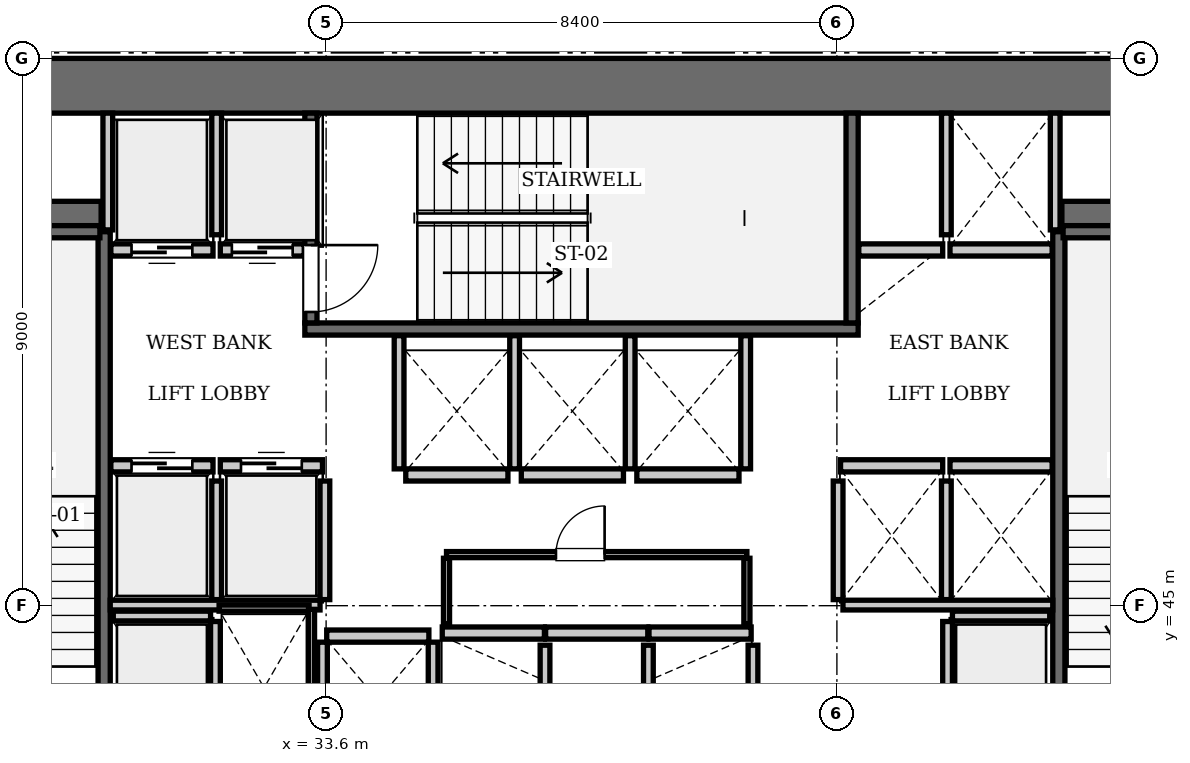
"""IFC4 building model, lengths in metres.
Left out: names, types, materials, properties, quantities, classifications, styles, units other than length and angle.
Written with IfcOpenShell. Run it as: python <this file> out.ifc"""

import sys

from ifc_helpers import new_model, si_unit, direction, frame, frame_2d, origin, place, context, subcontext, project, spatial, rectangle, extrude, element, fill, save


model = new_model("IFC4")
c1 = context("Model", 3, precision=1e-05, world=origin(), true_north=direction((0.0, 1.0)))
c2 = subcontext(c1, "Body", "Model", "MODEL_VIEW")
j1 = project(units=[si_unit("LENGTHUNIT", "METRE"), si_unit("PLANEANGLEUNIT", "RADIAN")], contexts=[c1])
p1 = place(None, origin())
s1 = spatial("IfcSite", under=j1, at=p1, CompositionType="ELEMENT")
p2 = place(p1, origin())
s2 = spatial("IfcBuilding", under=s1, at=p2, CompositionType="ELEMENT")
p3 = place(p2, frame((0.0, 0.0, 65.45)))
s3 = spatial("IfcBuildingStorey", under=s2, at=p3, CompositionType="ELEMENT", Elevation=65.45)
p4 = place(p3, frame((25.2, 53.55, 0.0), z_axis=(0.0, 0.0, 1.0), x_axis=(1.0, 0.0, 0.0)))
e1 = element("IfcWall", 1, at=p4, inside=s3, PredefinedType="SHEAR", context=c2, shape_type="SweptSolid", body=[
    extrude(rectangle(XDim=25.2, YDim=0.9, at=frame_2d((12.6, 0.0))), origin(), (0.0, 0.0, 1.0), 3.85),
])
p5 = place(p3, frame((26.1, 51.4, 0.0), z_axis=(0.0, 0.0, 1.0), x_axis=(1.0, 0.0, 0.0)))
e2 = element("IfcWall", 2, at=p5, inside=s3, PredefinedType="SHEAR", context=c2, shape_type="SweptSolid", body=[
    extrude(rectangle(XDim=3.8, YDim=0.5, at=frame_2d((1.9, 0.0))), origin(), (0.0, 0.0, 1.0), 3.85),
])
p6 = place(p3, frame((45.7, 51.4, 0.0), z_axis=(0.0, 0.0, 1.0), x_axis=(1.0, 0.0, 0.0)))
e3 = element("IfcWall", 3, at=p6, inside=s3, PredefinedType="SHEAR", context=c2, shape_type="SweptSolid", body=[
    extrude(rectangle(XDim=3.8, YDim=0.5, at=frame_2d((1.9, 0.0))), origin(), (0.0, 0.0, 1.0), 3.85),
])
p7 = place(p3, frame((29.95, 42.3, 0.0), z_axis=(0.0, 0.0, 1.0), x_axis=(0.0, 1.0, 0.0)))
e4 = element("IfcWall", 4, at=p7, inside=s3, PredefinedType="SOLIDWALL", context=c2, shape_type="SweptSolid", body=[
    extrude(rectangle(XDim=8.85, YDim=0.2, at=frame_2d((4.425, 0.0))), origin(), (0.0, 0.0, 1.0), 3.61),
])
p8 = place(p3, frame((26.38, 51.15, 0.0), z_axis=(0.0, 0.0, 1.0), x_axis=(1.0, 0.0, 0.0)))
e5 = element("IfcWall", 5, at=p8, inside=s3, PredefinedType="SOLIDWALL", context=c2, shape_type="SweptSolid", body=[
    extrude(rectangle(XDim=3.5, YDim=0.2, at=frame_2d((1.75, 0.0))), origin(), (0.0, 0.0, 1.0), 3.61),
])
p9 = place(p3, frame((33.25, 49.55, 0.0), z_axis=(0.0, 0.0, 1.0), x_axis=(1.0, 0.0, 0.0)))
e6 = element("IfcWall", 6, at=p9, inside=s3, PredefinedType="SOLIDWALL", context=c2, shape_type="SweptSolid", body=[
    extrude(rectangle(XDim=9.1, YDim=0.2, at=frame_2d((4.55, 0.0))), origin(), (0.0, 0.0, 1.0), 3.61),
])
p10 = place(p3, frame((42.25, 49.65, 0.0), z_axis=(0.0, 0.0, 1.0), x_axis=(0.0, 1.0, 0.0)))
e7 = element("IfcWall", 7, at=p10, inside=s3, PredefinedType="SOLIDWALL", context=c2, shape_type="SweptSolid", body=[
    extrude(rectangle(XDim=3.45, YDim=0.2, at=frame_2d((1.725, 0.0))), origin(), (0.0, 0.0, 1.0), 3.61),
])
p11 = place(p3, frame((33.35, 49.65, 0.0), z_axis=(0.0, 0.0, 1.0), x_axis=(0.0, 1.0, 0.0)))
e8 = element("IfcWall", 8, at=p11, inside=s3, PredefinedType="SOLIDWALL", context=c2, shape_type="SweptSolid", body=[
    extrude(rectangle(XDim=3.45, YDim=0.2, at=frame_2d((1.725, 0.0))), origin(), (0.0, 0.0, 1.0), 3.61),
])
p12 = place(p11, frame((0.18, 0.0, 0.0)))
e9 = element("IfcOpeningElement", 9, at=p12, cuts=e8, PredefinedType="OPENING", context=c2, shape_type="SweptSolid", body=[
    extrude(rectangle(XDim=1.1, YDim=2.15, at=frame_2d((0.55, 1.075))), frame((0.0, 0.11, 0.0), z_axis=(0.0, -1.0, 0.0), x_axis=(1.0, 0.0, 0.0)), (0.0, 0.0, 1.0), 0.22),
])
p13 = place(p3, frame((45.65, 42.3, 0.0), z_axis=(0.0, 0.0, 1.0), x_axis=(0.0, 1.0, 0.0)))
e10 = element("IfcWall", 10, at=p13, inside=s3, PredefinedType="SOLIDWALL", context=c2, shape_type="SweptSolid", body=[
    extrude(rectangle(XDim=8.85, YDim=0.2, at=frame_2d((4.425, 0.0))), origin(), (0.0, 0.0, 1.0), 3.61),
])
p14 = place(p3, frame((45.72, 51.15, 0.0), z_axis=(0.0, 0.0, 1.0), x_axis=(1.0, 0.0, 0.0)))
e11 = element("IfcWall", 11, at=p14, inside=s3, PredefinedType="SOLIDWALL", context=c2, shape_type="SweptSolid", body=[
    extrude(rectangle(XDim=3.5, YDim=0.2, at=frame_2d((1.75, 0.0))), origin(), (0.0, 0.0, 1.0), 3.61),
])
p15 = place(p3, frame((30.06, 47.3, 0.0), z_axis=(0.0, 0.0, 1.0), x_axis=(1.0, 0.0, 0.0)))
e12 = element("IfcWall", 12, at=p15, inside=s3, PredefinedType="SOLIDWALL", context=c2, shape_type="SweptSolid", body=[
    extrude(rectangle(XDim=1.68, YDim=0.2, at=frame_2d((0.84, 0.0))), origin(), (0.0, 0.0, 1.0), 3.61),
])
p16 = place(p15, frame((0.34, 0.0, 0.0)))
e13 = element("IfcOpeningElement", 13, at=p16, cuts=e12, PredefinedType="OPENING", context=c2, shape_type="SweptSolid", body=[
    extrude(rectangle(XDim=1.0, YDim=2.15, at=frame_2d((0.5, 1.075))), frame((0.0, 0.11, 0.0), z_axis=(0.0, -1.0, 0.0), x_axis=(1.0, 0.0, 0.0)), (0.0, 0.0, 1.0), 0.22),
])
p17 = place(p3, frame((31.86, 47.3, 0.0), z_axis=(0.0, 0.0, 1.0), x_axis=(1.0, 0.0, 0.0)))
e14 = element("IfcWall", 14, at=p17, inside=s3, PredefinedType="SOLIDWALL", context=c2, shape_type="SweptSolid", body=[
    extrude(rectangle(XDim=1.68, YDim=0.2, at=frame_2d((0.84, 0.0))), origin(), (0.0, 0.0, 1.0), 3.61),
])
p18 = place(p17, frame((0.34, 0.0, 0.0)))
e15 = element("IfcOpeningElement", 15, at=p18, cuts=e14, PredefinedType="OPENING", context=c2, shape_type="SweptSolid", body=[
    extrude(rectangle(XDim=1.0, YDim=2.15, at=frame_2d((0.5, 1.075))), frame((0.0, 0.11, 0.0), z_axis=(0.0, -1.0, 0.0), x_axis=(1.0, 0.0, 0.0)), (0.0, 0.0, 1.0), 0.22),
])
p19 = place(p3, frame((30.06, 50.85, 0.0), z_axis=(0.0, 0.0, 1.0), x_axis=(1.0, 0.0, 0.0)))
e16 = element("IfcWall", 16, at=p19, inside=s3, PredefinedType="SOLIDWALL", context=c2, shape_type="SweptSolid", body=[
    extrude(rectangle(XDim=1.68, YDim=0.2, at=frame_2d((0.84, 0.0))), origin(), (0.0, 0.0, 1.0), 3.61),
])
p20 = place(p19, frame((0.34, 0.0, 0.0)))
e17 = element("IfcOpeningElement", 17, at=p20, cuts=e16, PredefinedType="OPENING", context=c2, shape_type="SweptSolid", body=[
    extrude(rectangle(XDim=1.0, YDim=2.15, at=frame_2d((0.5, 1.075))), frame((0.0, 0.11, 0.0), z_axis=(0.0, -1.0, 0.0), x_axis=(1.0, 0.0, 0.0)), (0.0, 0.0, 1.0), 0.22),
])
p21 = place(p3, frame((31.86, 50.85, 0.0), z_axis=(0.0, 0.0, 1.0), x_axis=(1.0, 0.0, 0.0)))
e18 = element("IfcWall", 18, at=p21, inside=s3, PredefinedType="SOLIDWALL", context=c2, shape_type="SweptSolid", body=[
    extrude(rectangle(XDim=1.38, YDim=0.2, at=frame_2d((0.69, 0.0))), origin(), (0.0, 0.0, 1.0), 3.61),
])
p22 = place(p21, frame((0.19, 0.0, 0.0)))
e19 = element("IfcOpeningElement", 19, at=p22, cuts=e18, PredefinedType="OPENING", context=c2, shape_type="SweptSolid", body=[
    extrude(rectangle(XDim=1.0, YDim=2.15, at=frame_2d((0.5, 1.075))), frame((0.0, 0.11, 0.0), z_axis=(0.0, -1.0, 0.0), x_axis=(1.0, 0.0, 0.0)), (0.0, 0.0, 1.0), 0.22),
])
for number, where, z_axis, x_axis in (
    (20, (42.06, 47.3, 0.0), (0.0, 0.0, 1.0), (1.0, 0.0, 0.0)),
    (21, (43.86, 47.3, 0.0), (0.0, 0.0, 1.0), (1.0, 0.0, 0.0)),
):
    element("IfcWall", number, at=place(p3, frame(where, z_axis=z_axis, x_axis=x_axis)), inside=s3, PredefinedType="SOLIDWALL", context=c2, shape_type="SweptSolid", body=[
        extrude(rectangle(XDim=1.68, YDim=0.2, at=frame_2d((0.84, 0.0))), origin(), (0.0, 0.0, 1.0), 3.61),
    ])
p23 = place(p3, frame((42.36, 50.85, 0.0), z_axis=(0.0, 0.0, 1.0), x_axis=(1.0, 0.0, 0.0)))
e22 = element("IfcWall", 22, at=p23, inside=s3, PredefinedType="SOLIDWALL", context=c2, shape_type="SweptSolid", body=[
    extrude(rectangle(XDim=1.38, YDim=0.2, at=frame_2d((0.69, 0.0))), origin(), (0.0, 0.0, 1.0), 3.61),
])
for number, where, z_axis, x_axis in (
    (23, (43.86, 50.85, 0.0), (0.0, 0.0, 1.0), (1.0, 0.0, 0.0)),
    (24, (35.51, 44.55, 0.0), (0.0, 0.0, 1.0), (1.0, 0.0, 0.0)),
    (25, (37.21, 44.55, 0.0), (0.0, 0.0, 1.0), (1.0, 0.0, 0.0)),
):
    element("IfcWall", number, at=place(p3, frame(where, z_axis=z_axis, x_axis=x_axis)), inside=s3, PredefinedType="SOLIDWALL", context=c2, shape_type="SweptSolid", body=[
        extrude(rectangle(XDim=1.68, YDim=0.2, at=frame_2d((0.84, 0.0))), origin(), (0.0, 0.0, 1.0), 3.61),
    ])
for number, where, z_axis, x_axis in (
    (26, (38.91, 44.55, 0.0), (0.0, 0.0, 1.0), (1.0, 0.0, 0.0)),
    (27, (34.91, 47.15, 0.0), (0.0, 0.0, 1.0), (1.0, 0.0, 0.0)),
):
    element("IfcWall", number, at=place(p3, frame(where, z_axis=z_axis, x_axis=x_axis)), inside=s3, PredefinedType="SOLIDWALL", context=c2, shape_type="SweptSolid", body=[
        extrude(rectangle(XDim=1.68, YDim=0.2, at=frame_2d((0.84, 0.0))), origin(), (0.0, 0.0, 1.0), 3.61),
    ])
for number, where, z_axis, x_axis in (
    (28, (36.81, 47.15, 0.0), (0.0, 0.0, 1.0), (1.0, 0.0, 0.0)),
    (29, (38.71, 47.15, 0.0), (0.0, 0.0, 1.0), (1.0, 0.0, 0.0)),
    (30, (33.61, 44.5, 0.0), (0.0, 0.0, 1.0), (1.0, 0.0, 0.0)),
):
    element("IfcWall", number, at=place(p3, frame(where, z_axis=z_axis, x_axis=x_axis)), inside=s3, PredefinedType="SOLIDWALL", context=c2, shape_type="SweptSolid", body=[
        extrude(rectangle(XDim=1.68, YDim=0.2, at=frame_2d((0.84, 0.0))), origin(), (0.0, 0.0, 1.0), 3.61),
    ])
p24 = place(p3, frame((30.1, 44.83, 0.0), z_axis=(0.0, 0.0, 1.0), x_axis=(1.0, 0.0, 0.0)))
e31 = element("IfcWall", 31, at=p24, inside=s3, PredefinedType="SOLIDWALL", context=c2, shape_type="SweptSolid", body=[
    extrude(rectangle(XDim=1.6, YDim=0.16, at=frame_2d((0.8, 0.0))), origin(), (0.0, 0.0, 1.0), 3.61),
])
p25 = place(p3, frame((31.78, 42.3, 0.0), z_axis=(0.0, 0.0, 1.0), x_axis=(0.0, 1.0, 0.0)))
e32 = element("IfcWall", 32, at=p25, inside=s3, PredefinedType="SOLIDWALL", context=c2, shape_type="SweptSolid", body=[
    extrude(rectangle(XDim=2.44, YDim=0.16, at=frame_2d((1.22, 0.0))), origin(), (0.0, 0.0, 1.0), 3.61),
])
p26 = place(p3, frame((43.9, 44.83, 0.0), z_axis=(0.0, 0.0, 1.0), x_axis=(1.0, 0.0, 0.0)))
e33 = element("IfcWall", 33, at=p26, inside=s3, PredefinedType="SOLIDWALL", context=c2, shape_type="SweptSolid", body=[
    extrude(rectangle(XDim=1.6, YDim=0.16, at=frame_2d((0.8, 0.0))), origin(), (0.0, 0.0, 1.0), 3.61),
])
p27 = place(p3, frame((43.82, 42.3, 0.0), z_axis=(0.0, 0.0, 1.0), x_axis=(0.0, 1.0, 0.0)))
e34 = element("IfcWall", 34, at=p27, inside=s3, PredefinedType="SOLIDWALL", context=c2, shape_type="SweptSolid", body=[
    extrude(rectangle(XDim=2.44, YDim=0.16, at=frame_2d((1.22, 0.0))), origin(), (0.0, 0.0, 1.0), 3.61),
])
for number, where, z_axis, x_axis in (
    (35, (31.8, 45.1, 0.0), (0.0, 0.0, 1.0), (0.0, 1.0, 0.0)),
    (36, (33.58, 45.1, 0.0), (0.0, 0.0, 1.0), (0.0, 1.0, 0.0)),
):
    element("IfcWall", number, at=place(p3, frame(where, z_axis=z_axis, x_axis=x_axis)), inside=s3, PredefinedType="SOLIDWALL", context=c2, shape_type="SweptSolid", body=[
        extrude(rectangle(XDim=1.95, YDim=0.16, at=frame_2d((0.975, 0.0))), origin(), (0.0, 0.0, 1.0), 3.61),
    ])
p28 = place(p3, frame((30.05, 45.01, 0.0), z_axis=(0.0, 0.0, 1.0), x_axis=(1.0, 0.0, 0.0)))
e37 = element("IfcWall", 37, at=p28, inside=s3, PredefinedType="SOLIDWALL", context=c2, shape_type="SweptSolid", body=[
    extrude(rectangle(XDim=3.45, YDim=0.16, at=frame_2d((1.725, 0.0))), origin(), (0.0, 0.0, 1.0), 3.61),
])
p29 = place(p3, frame((30.01, 51.18, 0.0), z_axis=(0.0, 0.0, 1.0), x_axis=(0.0, 1.0, 0.0)))
e38 = element("IfcWall", 38, at=p29, inside=s3, PredefinedType="SOLIDWALL", context=c2, shape_type="SweptSolid", body=[
    extrude(rectangle(XDim=1.92, YDim=0.16, at=frame_2d((0.96, 0.0))), origin(), (0.0, 0.0, 1.0), 3.61),
])
p30 = place(p3, frame((31.8, 51.1, 0.0), z_axis=(0.0, 0.0, 1.0), x_axis=(0.0, 1.0, 0.0)))
e39 = element("IfcWall", 39, at=p30, inside=s3, PredefinedType="SOLIDWALL", context=c2, shape_type="SweptSolid", body=[
    extrude(rectangle(XDim=2.0, YDim=0.16, at=frame_2d((1.0, 0.0))), origin(), (0.0, 0.0, 1.0), 3.61),
])
for number, where, z_axis, x_axis in (
    (40, (42.02, 45.1, 0.0), (0.0, 0.0, 1.0), (0.0, 1.0, 0.0)),
    (41, (43.8, 45.1, 0.0), (0.0, 0.0, 1.0), (0.0, 1.0, 0.0)),
):
    element("IfcWall", number, at=place(p3, frame(where, z_axis=z_axis, x_axis=x_axis)), inside=s3, PredefinedType="SOLIDWALL", context=c2, shape_type="SweptSolid", body=[
        extrude(rectangle(XDim=1.95, YDim=0.16, at=frame_2d((0.975, 0.0))), origin(), (0.0, 0.0, 1.0), 3.61),
    ])
p31 = place(p3, frame((42.1, 45.01, 0.0), z_axis=(0.0, 0.0, 1.0), x_axis=(1.0, 0.0, 0.0)))
e42 = element("IfcWall", 42, at=p31, inside=s3, PredefinedType="SOLIDWALL", context=c2, shape_type="SweptSolid", body=[
    extrude(rectangle(XDim=3.45, YDim=0.16, at=frame_2d((1.725, 0.0))), origin(), (0.0, 0.0, 1.0), 3.61),
])
p32 = place(p3, frame((45.59, 51.18, 0.0), z_axis=(0.0, 0.0, 1.0), x_axis=(0.0, 1.0, 0.0)))
e43 = element("IfcWall", 43, at=p32, inside=s3, PredefinedType="SOLIDWALL", context=c2, shape_type="SweptSolid", body=[
    extrude(rectangle(XDim=1.92, YDim=0.16, at=frame_2d((0.96, 0.0))), origin(), (0.0, 0.0, 1.0), 3.61),
])
p33 = place(p3, frame((43.8, 51.1, 0.0), z_axis=(0.0, 0.0, 1.0), x_axis=(0.0, 1.0, 0.0)))
e44 = element("IfcWall", 44, at=p33, inside=s3, PredefinedType="SOLIDWALL", context=c2, shape_type="SweptSolid", body=[
    extrude(rectangle(XDim=2.0, YDim=0.16, at=frame_2d((1.0, 0.0))), origin(), (0.0, 0.0, 1.0), 3.61),
])
for number, where, z_axis, x_axis in (
    (45, (37.2, 42.3, 0.0), (0.0, 0.0, 1.0), (0.0, 1.0, 0.0)),
    (46, (38.9, 42.3, 0.0), (0.0, 0.0, 1.0), (0.0, 1.0, 0.0)),
    (47, (40.62, 42.3, 0.0), (0.0, 0.0, 1.0), (0.0, 1.0, 0.0)),
):
    element("IfcWall", number, at=place(p3, frame(where, z_axis=z_axis, x_axis=x_axis)), inside=s3, PredefinedType="SOLIDWALL", context=c2, shape_type="SweptSolid", body=[
        extrude(rectangle(XDim=2.05, YDim=0.16, at=frame_2d((1.025, 0.0))), origin(), (0.0, 0.0, 1.0), 3.61),
    ])
for number, where, z_axis, x_axis in (
    (48, (34.8, 47.25, 0.0), (0.0, 0.0, 1.0), (0.0, 1.0, 0.0)),
    (49, (36.7, 47.25, 0.0), (0.0, 0.0, 1.0), (0.0, 1.0, 0.0)),
    (50, (38.6, 47.25, 0.0), (0.0, 0.0, 1.0), (0.0, 1.0, 0.0)),
    (51, (40.5, 47.25, 0.0), (0.0, 0.0, 1.0), (0.0, 1.0, 0.0)),
):
    element("IfcWall", number, at=place(p3, frame(where, z_axis=z_axis, x_axis=x_axis)), inside=s3, PredefinedType="SOLIDWALL", context=c2, shape_type="SweptSolid", body=[
        extrude(rectangle(XDim=2.19, YDim=0.16, at=frame_2d((1.095, 0.0))), origin(), (0.0, 0.0, 1.0), 3.61),
    ])
for number, where, z_axis, x_axis in (
    (52, (33.54, 42.3, 0.0), (0.0, 0.0, 1.0), (0.0, 1.0, 0.0)),
    (53, (35.36, 42.3, 0.0), (0.0, 0.0, 1.0), (0.0, 1.0, 0.0)),
):
    element("IfcWall", number, at=place(p3, frame(where, z_axis=z_axis, x_axis=x_axis)), inside=s3, PredefinedType="SOLIDWALL", context=c2, shape_type="SweptSolid", body=[
        extrude(rectangle(XDim=2.1, YDim=0.16, at=frame_2d((1.05, 0.0))), origin(), (0.0, 0.0, 1.0), 3.61),
    ])
p34 = place(p3, frame((31.84, 44.96, 0.0), z_axis=(0.0, 0.0, 1.0), x_axis=(1.0, 0.0, 0.0)))
e54 = element("IfcWall", 54, at=p34, inside=s3, PredefinedType="PARTITIONING", context=c2, shape_type="SweptSolid", body=[
    extrude(rectangle(XDim=1.48, YDim=0.1, at=frame_2d((0.74, 0.0))), origin(), (0.0, 0.0, 1.0), 3.61),
])
p35 = place(p3, frame((33.36, 42.36, 0.0), z_axis=(0.0, 0.0, 1.0), x_axis=(0.0, 1.0, 0.0)))
e55 = element("IfcWall", 55, at=p35, inside=s3, PredefinedType="PARTITIONING", context=c2, shape_type="SweptSolid", body=[
    extrude(rectangle(XDim=2.58, YDim=0.1, at=frame_2d((1.29, 0.0))), origin(), (0.0, 0.0, 1.0), 3.61),
])
p36 = place(p3, frame((35.58, 45.84, 0.0), z_axis=(0.0, 0.0, 1.0), x_axis=(1.0, 0.0, 0.0)))
e56 = element("IfcWall", 56, at=p36, inside=s3, PredefinedType="PARTITIONING", context=c2, shape_type="SweptSolid", body=[
    extrude(rectangle(XDim=4.94, YDim=0.1, at=frame_2d((2.47, 0.0))), origin(), (0.0, 0.0, 1.0), 3.61),
])
p37 = place(p36, frame((1.8, 0.0, 0.0)))
e57 = element("IfcOpeningElement", 57, at=p37, cuts=e56, PredefinedType="OPENING", context=c2, shape_type="SweptSolid", body=[
    extrude(rectangle(XDim=0.8, YDim=2.05, at=frame_2d((0.4, 1.025))), frame((0.0, 0.06, 0.0), z_axis=(0.0, -1.0, 0.0), x_axis=(1.0, 0.0, 0.0)), (0.0, 0.0, 1.0), 0.12),
])
for number, where, z_axis, x_axis in (
    (58, (35.58, 44.7, 0.0), (0.0, 0.0, 1.0), (0.0, 1.0, 0.0)),
    (59, (40.52, 44.7, 0.0), (0.0, 0.0, 1.0), (0.0, 1.0, 0.0)),
):
    element("IfcWall", number, at=place(p3, frame(where, z_axis=z_axis, x_axis=x_axis)), inside=s3, PredefinedType="PARTITIONING", context=c2, shape_type="SweptSolid", body=[
        extrude(rectangle(XDim=1.08, YDim=0.1, at=frame_2d((0.54, 0.0))), origin(), (0.0, 0.0, 1.0), 3.61),
    ])
p38 = place(p12, frame((1.1, 0.0, 0.0), z_axis=(0.0, 0.0, 1.0), x_axis=(-1.0, 0.0, 0.0)))
e60 = element("IfcDoor", 60, at=p38, inside=s3, OperationType="SINGLE_SWING_LEFT", PredefinedType="DOOR", context=c2, shape_type="SweptSolid", body=[
    extrude(rectangle(XDim=1.1, YDim=2.15, at=frame_2d((0.55, 1.075))), frame((0.0, 0.025, 0.0), z_axis=(0.0, -1.0, 0.0), x_axis=(1.0, 0.0, 0.0)), (0.0, 0.0, 1.0), 0.05),
])
fill(e9, e60)
p39 = place(p16, origin())
e61 = element("IfcDoor", 61, at=p39, inside=s3, OperationType="SLIDING_TO_LEFT", PredefinedType="DOOR", context=c2, shape_type="SweptSolid", body=[
    extrude(rectangle(XDim=1.0, YDim=2.15, at=frame_2d((0.5, 1.075))), frame((0.0, 0.025, 0.0), z_axis=(0.0, -1.0, 0.0), x_axis=(1.0, 0.0, 0.0)), (0.0, 0.0, 1.0), 0.05),
])
fill(e13, e61)
p40 = place(p18, origin())
e62 = element("IfcDoor", 62, at=p40, inside=s3, OperationType="SLIDING_TO_LEFT", PredefinedType="DOOR", context=c2, shape_type="SweptSolid", body=[
    extrude(rectangle(XDim=1.0, YDim=2.15, at=frame_2d((0.5, 1.075))), frame((0.0, 0.025, 0.0), z_axis=(0.0, -1.0, 0.0), x_axis=(1.0, 0.0, 0.0)), (0.0, 0.0, 1.0), 0.05),
])
fill(e15, e62)
p41 = place(p20, frame((1.0, 0.0, 0.0), z_axis=(0.0, 0.0, 1.0), x_axis=(-1.0, 0.0, 0.0)))
e63 = element("IfcDoor", 63, at=p41, inside=s3, OperationType="SLIDING_TO_LEFT", PredefinedType="DOOR", context=c2, shape_type="SweptSolid", body=[
    extrude(rectangle(XDim=1.0, YDim=2.15, at=frame_2d((0.5, 1.075))), frame((0.0, 0.025, 0.0), z_axis=(0.0, -1.0, 0.0), x_axis=(1.0, 0.0, 0.0)), (0.0, 0.0, 1.0), 0.05),
])
fill(e17, e63)
p42 = place(p22, frame((1.0, 0.0, 0.0), z_axis=(0.0, 0.0, 1.0), x_axis=(-1.0, 0.0, 0.0)))
e64 = element("IfcDoor", 64, at=p42, inside=s3, OperationType="SLIDING_TO_LEFT", PredefinedType="DOOR", context=c2, shape_type="SweptSolid", body=[
    extrude(rectangle(XDim=1.0, YDim=2.15, at=frame_2d((0.5, 1.075))), frame((0.0, 0.025, 0.0), z_axis=(0.0, -1.0, 0.0), x_axis=(1.0, 0.0, 0.0)), (0.0, 0.0, 1.0), 0.05),
])
fill(e19, e64)
p43 = place(p37, origin())
e65 = element("IfcDoor", 65, at=p43, inside=s3, OperationType="SINGLE_SWING_RIGHT", PredefinedType="DOOR", context=c2, shape_type="SweptSolid", body=[
    extrude(rectangle(XDim=0.8, YDim=2.05, at=frame_2d((0.4, 1.025))), frame((0.0, 0.025, 0.0), z_axis=(0.0, -1.0, 0.0), x_axis=(1.0, 0.0, 0.0)), (0.0, 0.0, 1.0), 0.05),
])
fill(e57, e65)
save(model, sys.argv[1])
